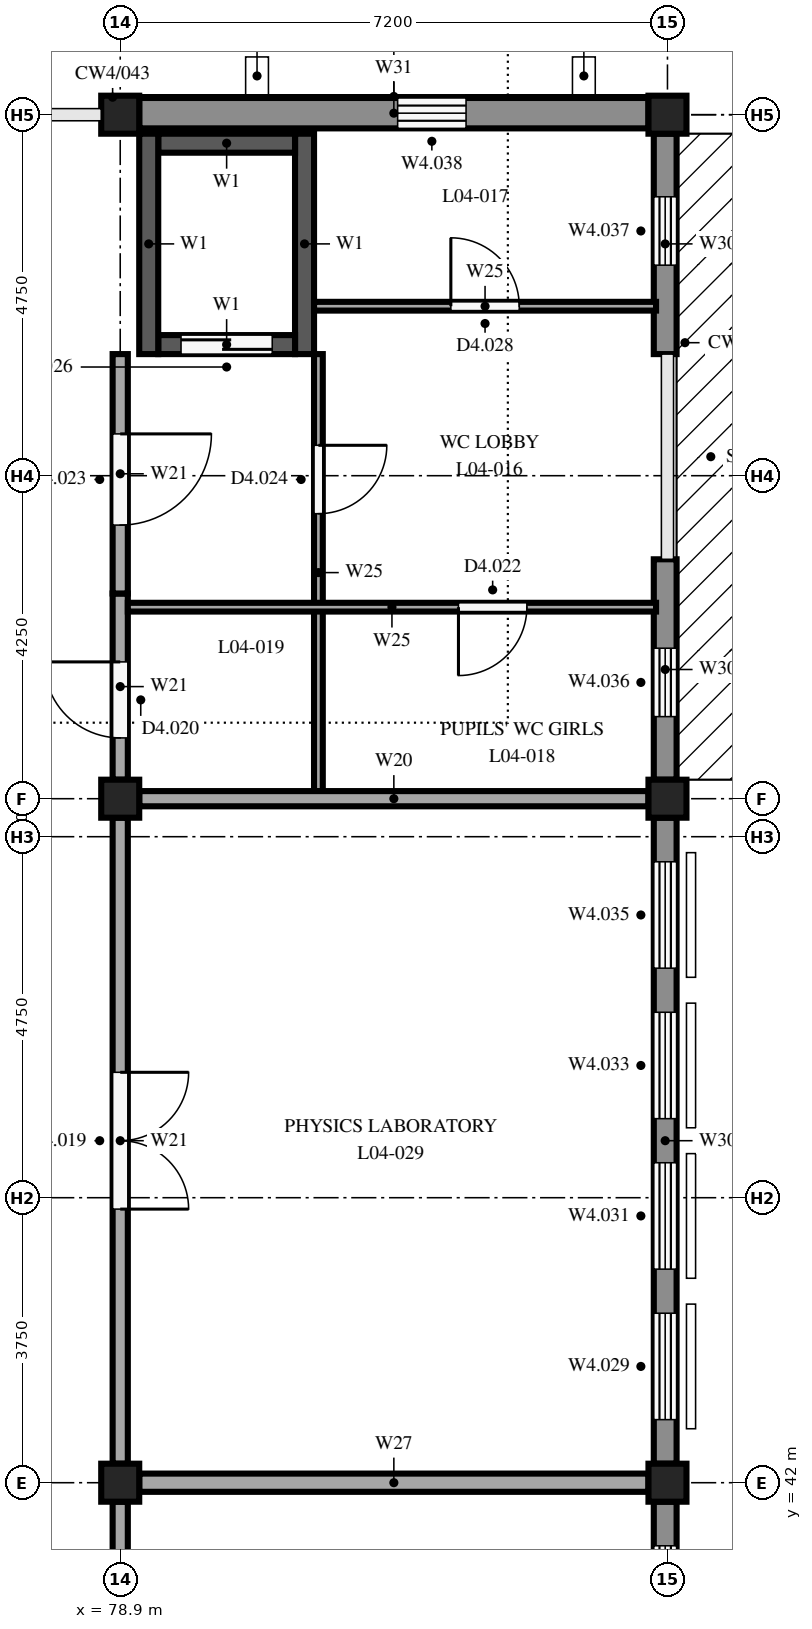
"""IFC4 building model, lengths in metres.
Left out: names, types, materials, properties, quantities, classifications, styles, units other than length and angle.
Written with IfcOpenShell. Run it as: python <this file> out.ifc"""

import sys

from ifc_helpers import new_model, si_unit, direction, frame, frame_2d, origin, origin_2d, place, context, subcontext, project, spatial, rectangle, extrude, element, fill, save


model = new_model("IFC4")
c1 = context("Model", 3, precision=1e-05, world=origin(), true_north=direction((0.0, 1.0)))
c2 = subcontext(c1, "Body", "Model", "MODEL_VIEW")
j1 = project(units=[si_unit("LENGTHUNIT", "METRE"), si_unit("PLANEANGLEUNIT", "RADIAN")], contexts=[c1])
p1 = place(None, origin())
s1 = spatial("IfcSite", under=j1, at=p1, CompositionType="ELEMENT")
p2 = place(p1, origin())
s2 = spatial("IfcBuilding", under=s1, at=p2, CompositionType="ELEMENT")
p3 = place(p2, frame((0.0, 0.0, 15.3)))
s3 = spatial("IfcBuildingStorey", under=s2, at=p3, CompositionType="ELEMENT", Elevation=15.3)
for number, where, z_axis, x_axis in (
    (1, (78.9, 42.0, 0.0), (0.0, 0.0, 1.0), (1.0, 0.0, 0.0)),
    (2, (78.9, 51.0, 0.0), (0.0, 0.0, 1.0), (1.0, 0.0, 0.0)),
    (3, (78.9, 60.0, 0.0), (0.0, 0.0, 1.0), (1.0, 0.0, 0.0)),
    (4, (86.1, 42.0, 0.0), (0.0, 0.0, 1.0), (1.0, 0.0, 0.0)),
    (5, (86.1, 51.0, 0.0), (0.0, 0.0, 1.0), (1.0, 0.0, 0.0)),
    (6, (86.1, 60.0, 0.0), (0.0, 0.0, 1.0), (1.0, 0.0, 0.0)),
):
    element("IfcColumn", number, at=place(p3, frame(where, z_axis=z_axis, x_axis=x_axis)), inside=s3, PredefinedType="COLUMN", context=c2, shape_type="SweptSolid", body=[
        extrude(rectangle(XDim=0.5, YDim=0.5, at=origin_2d()), origin(), (0.0, 0.0, 1.0), 3.3),
    ])
for number, where, z_axis, x_axis in (
    (7, (79.275, 56.85, 0.0), (0.0, 0.0, 1.0), (0.0, 1.0, 0.0)),
    (8, (81.325, 56.85, 0.0), (0.0, 0.0, 1.0), (0.0, 1.0, 0.0)),
):
    element("IfcWall", number, at=place(p3, frame(where, z_axis=z_axis, x_axis=x_axis)), inside=s3, PredefinedType="SHEAR", context=c2, shape_type="SweptSolid", body=[
        extrude(rectangle(XDim=2.9, YDim=0.25, at=frame_2d((1.45, 0.0))), origin(), (0.0, 0.0, 1.0), 3.3),
    ])
p4 = place(p3, frame((79.4, 56.975, 0.0), z_axis=(0.0, 0.0, 1.0), x_axis=(1.0, 0.0, 0.0)))
e9 = element("IfcWall", 9, at=p4, inside=s3, PredefinedType="SHEAR", context=c2, shape_type="SweptSolid", body=[
    extrude(rectangle(XDim=1.8, YDim=0.25, at=frame_2d((0.9, 0.0))), origin(), (0.0, 0.0, 1.0), 3.3),
])
p5 = place(p4, frame((0.3, 0.0, 0.0)))
e10 = element("IfcOpeningElement", 10, at=p5, cuts=e9, PredefinedType="OPENING", context=c2, shape_type="SweptSolid", body=[
    extrude(rectangle(XDim=1.2, YDim=2.1, at=frame_2d((0.6, 1.05))), frame((0.0, 0.135, 0.0), z_axis=(0.0, -1.0, 0.0), x_axis=(1.0, 0.0, 0.0)), (0.0, 0.0, 1.0), 0.27),
])
p6 = place(p3, frame((79.4, 59.625, 0.0), z_axis=(0.0, 0.0, 1.0), x_axis=(1.0, 0.0, 0.0)))
e11 = element("IfcWall", 11, at=p6, inside=s3, PredefinedType="SHEAR", context=c2, shape_type="SweptSolid", body=[
    extrude(rectangle(XDim=1.8, YDim=0.25, at=frame_2d((0.9, 0.0))), origin(), (0.0, 0.0, 1.0), 3.3),
])
p7 = place(p3, frame((86.07, 41.75, 0.0), z_axis=(0.0, 0.0, 1.0), x_axis=(0.0, -1.0, 0.0)))
e12 = element("IfcWall", 12, at=p7, inside=s3, PredefinedType="STANDARD", context=c2, shape_type="SweptSolid", body=[
    extrude(rectangle(XDim=8.5, YDim=0.3, at=frame_2d((4.25, 0.0))), origin(), (0.0, 0.0, 1.0), 2.75),
])
p8 = place(p7, frame((6.52, 0.0, 0.6)))
e13 = element("IfcOpeningElement", 13, at=p8, cuts=e12, PredefinedType="OPENING", context=c2, shape_type="SweptSolid", body=[
    extrude(rectangle(XDim=1.4, YDim=2.1, at=frame_2d((0.7, 1.05))), frame((0.0, 0.16, 0.0), z_axis=(0.0, -1.0, 0.0), x_axis=(1.0, 0.0, 0.0)), (0.0, 0.0, 1.0), 0.32),
])
p9 = place(p7, frame((4.54, 0.0, 0.6)))
e14 = element("IfcOpeningElement", 14, at=p9, cuts=e12, PredefinedType="OPENING", context=c2, shape_type="SweptSolid", body=[
    extrude(rectangle(XDim=1.4, YDim=2.1, at=frame_2d((0.7, 1.05))), frame((0.0, 0.16, 0.0), z_axis=(0.0, -1.0, 0.0), x_axis=(1.0, 0.0, 0.0)), (0.0, 0.0, 1.0), 0.32),
])
p10 = place(p7, frame((2.56, 0.0, 0.6)))
e15 = element("IfcOpeningElement", 15, at=p10, cuts=e12, PredefinedType="OPENING", context=c2, shape_type="SweptSolid", body=[
    extrude(rectangle(XDim=1.4, YDim=2.1, at=frame_2d((0.7, 1.05))), frame((0.0, 0.16, 0.0), z_axis=(0.0, -1.0, 0.0), x_axis=(1.0, 0.0, 0.0)), (0.0, 0.0, 1.0), 0.32),
])
p11 = place(p7, frame((0.58, 0.0, 0.6)))
e16 = element("IfcOpeningElement", 16, at=p11, cuts=e12, PredefinedType="OPENING", context=c2, shape_type="SweptSolid", body=[
    extrude(rectangle(XDim=1.4, YDim=2.1, at=frame_2d((0.7, 1.05))), frame((0.0, 0.16, 0.0), z_axis=(0.0, -1.0, 0.0), x_axis=(1.0, 0.0, 0.0)), (0.0, 0.0, 1.0), 0.32),
])
p12 = place(p3, frame((86.07, 50.75, 0.0), z_axis=(0.0, 0.0, 1.0), x_axis=(0.0, -1.0, 0.0)))
e17 = element("IfcWall", 17, at=p12, inside=s3, PredefinedType="STANDARD", context=c2, shape_type="SweptSolid", body=[
    extrude(rectangle(XDim=8.5, YDim=0.3, at=frame_2d((4.25, 0.0))), origin(), (0.0, 0.0, 1.0), 2.75),
])
p13 = place(p12, frame((6.52, 0.0, 0.9)))
e18 = element("IfcOpeningElement", 18, at=p13, cuts=e17, PredefinedType="OPENING", context=c2, shape_type="SweptSolid", body=[
    extrude(rectangle(XDim=1.4, YDim=1.8, at=frame_2d((0.7, 0.9))), frame((0.0, 0.16, 0.0), z_axis=(0.0, -1.0, 0.0), x_axis=(1.0, 0.0, 0.0)), (0.0, 0.0, 1.0), 0.32),
])
p14 = place(p12, frame((4.54, 0.0, 0.9)))
e19 = element("IfcOpeningElement", 19, at=p14, cuts=e17, PredefinedType="OPENING", context=c2, shape_type="SweptSolid", body=[
    extrude(rectangle(XDim=1.4, YDim=1.8, at=frame_2d((0.7, 0.9))), frame((0.0, 0.16, 0.0), z_axis=(0.0, -1.0, 0.0), x_axis=(1.0, 0.0, 0.0)), (0.0, 0.0, 1.0), 0.32),
])
p15 = place(p12, frame((2.56, 0.0, 0.9)))
e20 = element("IfcOpeningElement", 20, at=p15, cuts=e17, PredefinedType="OPENING", context=c2, shape_type="SweptSolid", body=[
    extrude(rectangle(XDim=1.4, YDim=1.8, at=frame_2d((0.7, 0.9))), frame((0.0, 0.16, 0.0), z_axis=(0.0, -1.0, 0.0), x_axis=(1.0, 0.0, 0.0)), (0.0, 0.0, 1.0), 0.32),
])
p16 = place(p12, frame((0.58, 0.0, 0.9)))
e21 = element("IfcOpeningElement", 21, at=p16, cuts=e17, PredefinedType="OPENING", context=c2, shape_type="SweptSolid", body=[
    extrude(rectangle(XDim=1.4, YDim=1.8, at=frame_2d((0.7, 0.9))), frame((0.0, 0.16, 0.0), z_axis=(0.0, -1.0, 0.0), x_axis=(1.0, 0.0, 0.0)), (0.0, 0.0, 1.0), 0.32),
])
p17 = place(p3, frame((86.07, 54.15, 0.0), z_axis=(0.0, 0.0, 1.0), x_axis=(0.0, -1.0, 0.0)))
e22 = element("IfcWall", 22, at=p17, inside=s3, PredefinedType="STANDARD", context=c2, shape_type="SweptSolid", body=[
    extrude(rectangle(XDim=2.9, YDim=0.3, at=frame_2d((1.45, 0.0))), origin(), (0.0, 0.0, 1.0), 2.75),
])
p18 = place(p17, frame((1.17, 0.0, 1.6)))
e23 = element("IfcOpeningElement", 23, at=p18, cuts=e22, PredefinedType="OPENING", context=c2, shape_type="SweptSolid", body=[
    extrude(rectangle(XDim=0.9, YDim=1.0, at=frame_2d((0.45, 0.5))), frame((0.0, 0.16, 0.0), z_axis=(0.0, -1.0, 0.0), x_axis=(1.0, 0.0, 0.0)), (0.0, 0.0, 1.0), 0.32),
])
p19 = place(p3, frame((86.07, 59.75, 0.0), z_axis=(0.0, 0.0, 1.0), x_axis=(0.0, -1.0, 0.0)))
e24 = element("IfcWall", 24, at=p19, inside=s3, PredefinedType="STANDARD", context=c2, shape_type="SweptSolid", body=[
    extrude(rectangle(XDim=2.9, YDim=0.3, at=frame_2d((1.45, 0.0))), origin(), (0.0, 0.0, 1.0), 2.75),
])
p20 = place(p19, frame((0.83, 0.0, 1.6)))
e25 = element("IfcOpeningElement", 25, at=p20, cuts=e24, PredefinedType="OPENING", context=c2, shape_type="SweptSolid", body=[
    extrude(rectangle(XDim=0.9, YDim=1.0, at=frame_2d((0.45, 0.5))), frame((0.0, 0.16, 0.0), z_axis=(0.0, -1.0, 0.0), x_axis=(1.0, 0.0, 0.0)), (0.0, 0.0, 1.0), 0.32),
])
p21 = place(p3, frame((79.15, 60.02, 0.0), z_axis=(0.0, 0.0, 1.0), x_axis=(1.0, 0.0, 0.0)))
e26 = element("IfcWall", 26, at=p21, inside=s3, PredefinedType="STANDARD", context=c2, shape_type="SweptSolid", body=[
    extrude(rectangle(XDim=6.7, YDim=0.4, at=frame_2d((3.35, 0.0))), origin(), (0.0, 0.0, 1.0), 2.8),
])
p22 = place(p21, frame((3.4, 0.0, 1.6)))
e27 = element("IfcOpeningElement", 27, at=p22, cuts=e26, PredefinedType="OPENING", context=c2, shape_type="SweptSolid", body=[
    extrude(rectangle(XDim=0.9, YDim=1.0, at=frame_2d((0.45, 0.5))), frame((0.0, 0.21, 0.0), z_axis=(0.0, -1.0, 0.0), x_axis=(1.0, 0.0, 0.0)), (0.0, 0.0, 1.0), 0.42),
])
p23 = place(p3, frame((78.9, 51.25, 0.0), z_axis=(0.0, 0.0, 1.0), x_axis=(0.0, 1.0, 0.0)))
e28 = element("IfcWall", 28, at=p23, inside=s3, PredefinedType="PARTITIONING", context=c2, shape_type="SweptSolid", body=[
    extrude(rectangle(XDim=2.45, YDim=0.2, at=frame_2d((1.225, 0.0))), origin(), (0.0, 0.0, 1.0), 2.8),
])
p24 = place(p23, frame((0.55, 0.0, 0.0)))
e29 = element("IfcOpeningElement", 29, at=p24, cuts=e28, PredefinedType="OPENING", context=c2, shape_type="SweptSolid", body=[
    extrude(rectangle(XDim=1.0, YDim=2.1, at=frame_2d((0.5, 1.05))), frame((0.0, 0.11, 0.0), z_axis=(0.0, -1.0, 0.0), x_axis=(1.0, 0.0, 0.0)), (0.0, 0.0, 1.0), 0.22),
])
p25 = place(p3, frame((78.9, 56.85, 0.0), z_axis=(0.0, 0.0, 1.0), x_axis=(0.0, -1.0, 0.0)))
e30 = element("IfcWall", 30, at=p25, inside=s3, PredefinedType="PARTITIONING", context=c2, shape_type="SweptSolid", body=[
    extrude(rectangle(XDim=3.15, YDim=0.2, at=frame_2d((1.575, 0.0))), origin(), (0.0, 0.0, 1.0), 2.8),
])
p26 = place(p25, frame((1.05, 0.0, 0.0)))
e31 = element("IfcOpeningElement", 31, at=p26, cuts=e30, PredefinedType="OPENING", context=c2, shape_type="SweptSolid", body=[
    extrude(rectangle(XDim=1.2, YDim=2.1, at=frame_2d((0.6, 1.05))), frame((0.0, 0.11, 0.0), z_axis=(0.0, -1.0, 0.0), x_axis=(1.0, 0.0, 0.0)), (0.0, 0.0, 1.0), 0.22),
])
p27 = place(p3, frame((79.15, 51.0, 0.0), z_axis=(0.0, 0.0, 1.0), x_axis=(1.0, 0.0, 0.0)))
e32 = element("IfcWall", 32, at=p27, inside=s3, PredefinedType="PARTITIONING", context=c2, shape_type="SweptSolid", body=[
    extrude(rectangle(XDim=6.7, YDim=0.2, at=frame_2d((3.35, 0.0))), origin(), (0.0, 0.0, 1.0), 2.8),
])
p28 = place(p3, frame((81.508, 56.85, 0.0), z_axis=(0.0, 0.0, 1.0), x_axis=(0.0, -1.0, 0.0)))
e33 = element("IfcWall", 33, at=p28, inside=s3, PredefinedType="PARTITIONING", context=c2, shape_type="SweptSolid", body=[
    extrude(rectangle(XDim=5.75, YDim=0.115, at=frame_2d((2.875, 0.0))), origin(), (0.0, 0.0, 1.0), 3.3),
])
p29 = place(p28, frame((1.2, 0.0, 0.0)))
e34 = element("IfcOpeningElement", 34, at=p29, cuts=e33, PredefinedType="OPENING", context=c2, shape_type="SweptSolid", body=[
    extrude(rectangle(XDim=0.9, YDim=2.1, at=frame_2d((0.45, 1.05))), frame((0.0, 0.067, 0.0), z_axis=(0.0, -1.0, 0.0), x_axis=(1.0, 0.0, 0.0)), (0.0, 0.0, 1.0), 0.135),
])
p30 = place(p3, frame((81.45, 57.48, 0.0), z_axis=(0.0, 0.0, 1.0), x_axis=(1.0, 0.0, 0.0)))
e35 = element("IfcWall", 35, at=p30, inside=s3, PredefinedType="PARTITIONING", context=c2, shape_type="SweptSolid", body=[
    extrude(rectangle(XDim=4.5, YDim=0.115, at=frame_2d((2.25, 0.0))), origin(), (0.0, 0.0, 1.0), 3.3),
])
p31 = place(p30, frame((1.8, 0.0, 0.0)))
e36 = element("IfcOpeningElement", 36, at=p31, cuts=e35, PredefinedType="OPENING", context=c2, shape_type="SweptSolid", body=[
    extrude(rectangle(XDim=0.9, YDim=2.1, at=frame_2d((0.45, 1.05))), frame((0.0, 0.067, 0.0), z_axis=(0.0, -1.0, 0.0), x_axis=(1.0, 0.0, 0.0)), (0.0, 0.0, 1.0), 0.135),
])
p32 = place(p3, frame((85.95, 53.52, 0.0), z_axis=(0.0, 0.0, 1.0), x_axis=(-1.0, 0.0, 0.0)))
e37 = element("IfcWall", 37, at=p32, inside=s3, PredefinedType="PARTITIONING", context=c2, shape_type="SweptSolid", body=[
    extrude(rectangle(XDim=6.95, YDim=0.115, at=frame_2d((3.475, 0.0))), origin(), (0.0, 0.0, 1.0), 3.3),
])
p33 = place(p32, frame((1.7, 0.0, 0.0)))
e38 = element("IfcOpeningElement", 38, at=p33, cuts=e37, PredefinedType="OPENING", context=c2, shape_type="SweptSolid", body=[
    extrude(rectangle(XDim=0.9, YDim=2.1, at=frame_2d((0.45, 1.05))), frame((0.0, 0.067, 0.0), z_axis=(0.0, -1.0, 0.0), x_axis=(1.0, 0.0, 0.0)), (0.0, 0.0, 1.0), 0.135),
])
p34 = place(p3, frame((78.9, 41.75, 0.0), z_axis=(0.0, 0.0, 1.0), x_axis=(0.0, -1.0, 0.0)))
e39 = element("IfcWall", 39, at=p34, inside=s3, PredefinedType="PARTITIONING", context=c2, shape_type="SweptSolid", body=[
    extrude(rectangle(XDim=8.5, YDim=0.2, at=frame_2d((4.25, 0.0))), origin(), (0.0, 0.0, 1.0), 2.8),
])
p35 = place(p34, frame((3.75, 0.0, 0.0)))
e40 = element("IfcOpeningElement", 40, at=p35, cuts=e39, PredefinedType="OPENING", context=c2, shape_type="SweptSolid", body=[
    extrude(rectangle(XDim=1.0, YDim=2.1, at=frame_2d((0.5, 1.05))), frame((0.0, 0.11, 0.0), z_axis=(0.0, -1.0, 0.0), x_axis=(1.0, 0.0, 0.0)), (0.0, 0.0, 1.0), 0.22),
])
p36 = place(p3, frame((78.9, 50.75, 0.0), z_axis=(0.0, 0.0, 1.0), x_axis=(0.0, -1.0, 0.0)))
e41 = element("IfcWall", 41, at=p36, inside=s3, PredefinedType="PARTITIONING", context=c2, shape_type="SweptSolid", body=[
    extrude(rectangle(XDim=8.5, YDim=0.2, at=frame_2d((4.25, 0.0))), origin(), (0.0, 0.0, 1.0), 2.8),
])
p37 = place(p36, frame((3.35, 0.0, 0.0)))
e42 = element("IfcOpeningElement", 42, at=p37, cuts=e41, PredefinedType="OPENING", context=c2, shape_type="SweptSolid", body=[
    extrude(rectangle(XDim=1.8, YDim=2.1, at=frame_2d((0.9, 1.05))), frame((0.0, 0.11, 0.0), z_axis=(0.0, -1.0, 0.0), x_axis=(1.0, 0.0, 0.0)), (0.0, 0.0, 1.0), 0.22),
])
p38 = place(p3, frame((79.15, 42.0, 0.0), z_axis=(0.0, 0.0, 1.0), x_axis=(1.0, 0.0, 0.0)))
e43 = element("IfcWall", 43, at=p38, inside=s3, PredefinedType="PARTITIONING", context=c2, shape_type="SweptSolid", body=[
    extrude(rectangle(XDim=6.7, YDim=0.24, at=frame_2d((3.35, 0.0))), origin(), (0.0, 0.0, 1.0), 2.8),
])
p39 = place(p11, origin())
e44 = element("IfcWindow", 44, at=p39, inside=s3, PartitioningType="DOUBLE_PANEL_VERTICAL", PredefinedType="WINDOW", context=c2, shape_type="SweptSolid", body=[
    extrude(rectangle(XDim=1.4, YDim=2.1, at=frame_2d((0.7, 1.05))), frame((0.0, 0.03, 0.0), z_axis=(0.0, -1.0, 0.0), x_axis=(1.0, 0.0, 0.0)), (0.0, 0.0, 1.0), 0.06),
])
fill(e16, e44)
p40 = place(p13, origin())
e45 = element("IfcWindow", 45, at=p40, inside=s3, PartitioningType="DOUBLE_PANEL_VERTICAL", PredefinedType="WINDOW", context=c2, shape_type="SweptSolid", body=[
    extrude(rectangle(XDim=1.4, YDim=1.8, at=frame_2d((0.7, 0.9))), frame((0.0, 0.03, 0.0), z_axis=(0.0, -1.0, 0.0), x_axis=(1.0, 0.0, 0.0)), (0.0, 0.0, 1.0), 0.06),
])
fill(e18, e45)
p41 = place(p14, origin())
e46 = element("IfcWindow", 46, at=p41, inside=s3, PartitioningType="DOUBLE_PANEL_VERTICAL", PredefinedType="WINDOW", context=c2, shape_type="SweptSolid", body=[
    extrude(rectangle(XDim=1.4, YDim=1.8, at=frame_2d((0.7, 0.9))), frame((0.0, 0.03, 0.0), z_axis=(0.0, -1.0, 0.0), x_axis=(1.0, 0.0, 0.0)), (0.0, 0.0, 1.0), 0.06),
])
fill(e19, e46)
p42 = place(p15, origin())
e47 = element("IfcWindow", 47, at=p42, inside=s3, PartitioningType="DOUBLE_PANEL_VERTICAL", PredefinedType="WINDOW", context=c2, shape_type="SweptSolid", body=[
    extrude(rectangle(XDim=1.4, YDim=1.8, at=frame_2d((0.7, 0.9))), frame((0.0, 0.03, 0.0), z_axis=(0.0, -1.0, 0.0), x_axis=(1.0, 0.0, 0.0)), (0.0, 0.0, 1.0), 0.06),
])
fill(e20, e47)
p43 = place(p16, origin())
e48 = element("IfcWindow", 48, at=p43, inside=s3, PartitioningType="DOUBLE_PANEL_VERTICAL", PredefinedType="WINDOW", context=c2, shape_type="SweptSolid", body=[
    extrude(rectangle(XDim=1.4, YDim=1.8, at=frame_2d((0.7, 0.9))), frame((0.0, 0.03, 0.0), z_axis=(0.0, -1.0, 0.0), x_axis=(1.0, 0.0, 0.0)), (0.0, 0.0, 1.0), 0.06),
])
fill(e21, e48)
p44 = place(p18, origin())
e49 = element("IfcWindow", 49, at=p44, inside=s3, PartitioningType="SINGLE_PANEL", PredefinedType="WINDOW", context=c2, shape_type="SweptSolid", body=[
    extrude(rectangle(XDim=0.9, YDim=1.0, at=frame_2d((0.45, 0.5))), frame((0.0, 0.03, 0.0), z_axis=(0.0, -1.0, 0.0), x_axis=(1.0, 0.0, 0.0)), (0.0, 0.0, 1.0), 0.06),
])
fill(e23, e49)
p45 = place(p20, origin())
e50 = element("IfcWindow", 50, at=p45, inside=s3, PartitioningType="SINGLE_PANEL", PredefinedType="WINDOW", context=c2, shape_type="SweptSolid", body=[
    extrude(rectangle(XDim=0.9, YDim=1.0, at=frame_2d((0.45, 0.5))), frame((0.0, 0.03, 0.0), z_axis=(0.0, -1.0, 0.0), x_axis=(1.0, 0.0, 0.0)), (0.0, 0.0, 1.0), 0.06),
])
fill(e25, e50)
p46 = place(p22, origin())
e51 = element("IfcWindow", 51, at=p46, inside=s3, PartitioningType="SINGLE_PANEL", PredefinedType="WINDOW", context=c2, shape_type="SweptSolid", body=[
    extrude(rectangle(XDim=0.9, YDim=1.0, at=frame_2d((0.45, 0.5))), frame((0.0, 0.03, 0.0), z_axis=(0.0, -1.0, 0.0), x_axis=(1.0, 0.0, 0.0)), (0.0, 0.0, 1.0), 0.06),
])
fill(e27, e51)
p47 = place(p24, origin())
e52 = element("IfcDoor", 52, at=p47, inside=s3, OperationType="SINGLE_SWING_RIGHT", PredefinedType="DOOR", context=c2, shape_type="SweptSolid", body=[
    extrude(rectangle(XDim=1.0, YDim=2.1, at=frame_2d((0.5, 1.05))), frame((0.0, 0.025, 0.0), z_axis=(0.0, -1.0, 0.0), x_axis=(1.0, 0.0, 0.0)), (0.0, 0.0, 1.0), 0.05),
])
fill(e29, e52)
p48 = place(p26, origin())
e53 = element("IfcDoor", 53, at=p48, inside=s3, OperationType="SINGLE_SWING_LEFT", PredefinedType="DOOR", context=c2, shape_type="SweptSolid", body=[
    extrude(rectangle(XDim=1.2, YDim=2.1, at=frame_2d((0.6, 1.05))), frame((0.0, 0.025, 0.0), z_axis=(0.0, -1.0, 0.0), x_axis=(1.0, 0.0, 0.0)), (0.0, 0.0, 1.0), 0.05),
])
fill(e31, e53)
p49 = place(p29, origin())
e54 = element("IfcDoor", 54, at=p49, inside=s3, OperationType="SINGLE_SWING_LEFT", PredefinedType="DOOR", context=c2, shape_type="SweptSolid", body=[
    extrude(rectangle(XDim=0.9, YDim=2.1, at=frame_2d((0.45, 1.05))), frame((0.0, 0.025, 0.0), z_axis=(0.0, -1.0, 0.0), x_axis=(1.0, 0.0, 0.0)), (0.0, 0.0, 1.0), 0.05),
])
fill(e34, e54)
p50 = place(p31, origin())
e55 = element("IfcDoor", 55, at=p50, inside=s3, OperationType="SINGLE_SWING_LEFT", PredefinedType="DOOR", context=c2, shape_type="SweptSolid", body=[
    extrude(rectangle(XDim=0.9, YDim=2.1, at=frame_2d((0.45, 1.05))), frame((0.0, 0.025, 0.0), z_axis=(0.0, -1.0, 0.0), x_axis=(1.0, 0.0, 0.0)), (0.0, 0.0, 1.0), 0.05),
])
fill(e36, e55)
p51 = place(p33, origin())
e56 = element("IfcDoor", 56, at=p51, inside=s3, OperationType="SINGLE_SWING_RIGHT", PredefinedType="DOOR", context=c2, shape_type="SweptSolid", body=[
    extrude(rectangle(XDim=0.9, YDim=2.1, at=frame_2d((0.45, 1.05))), frame((0.0, 0.025, 0.0), z_axis=(0.0, -1.0, 0.0), x_axis=(1.0, 0.0, 0.0)), (0.0, 0.0, 1.0), 0.05),
])
fill(e38, e56)
p52 = place(p37, origin())
e57 = element("IfcDoor", 57, at=p52, inside=s3, OperationType="DOUBLE_DOOR_DOUBLE_SWING", PredefinedType="DOOR", context=c2, shape_type="SweptSolid", body=[
    extrude(rectangle(XDim=1.8, YDim=2.1, at=frame_2d((0.9, 1.05))), frame((0.0, 0.025, 0.0), z_axis=(0.0, -1.0, 0.0), x_axis=(1.0, 0.0, 0.0)), (0.0, 0.0, 1.0), 0.05),
])
fill(e42, e57)
p53 = place(p5, origin())
e58 = element("IfcDoor", 58, at=p53, inside=s3, OperationType="SLIDING_TO_LEFT", PredefinedType="DOOR", context=c2, shape_type="SweptSolid", body=[
    extrude(rectangle(XDim=1.2, YDim=2.1, at=frame_2d((0.6, 1.05))), frame((0.0, 0.025, 0.0), z_axis=(0.0, -1.0, 0.0), x_axis=(1.0, 0.0, 0.0)), (0.0, 0.0, 1.0), 0.05),
])
fill(e10, e58)
save(model, sys.argv[1])
